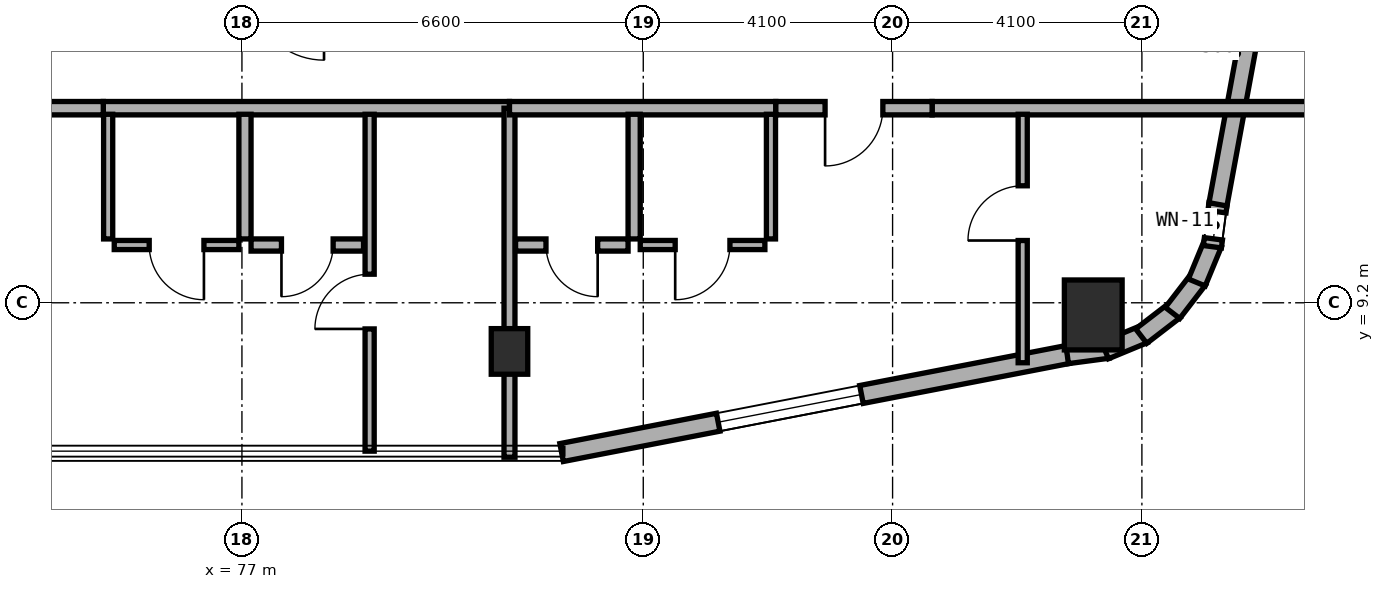
"""IFC4 building model, lengths in metres.
Left out: names, types, materials, properties, quantities, classifications, styles, units other than length and angle.
Written with IfcOpenShell. Run it as: python <this file> out.ifc"""

import sys

from ifc_helpers import new_model, si_unit, direction, frame, frame_2d, origin, origin_2d, place, context, subcontext, project, spatial, rectangle, extrude, element, fill, save


model = new_model("IFC4")
c1 = context("Model", 3, precision=1e-05, world=origin(), true_north=direction((0.0, 1.0)))
c2 = subcontext(c1, "Body", "Model", "MODEL_VIEW")
j1 = project(units=[si_unit("LENGTHUNIT", "METRE"), si_unit("PLANEANGLEUNIT", "RADIAN")], contexts=[c1])
p1 = place(None, origin())
s1 = spatial("IfcSite", under=j1, at=p1, CompositionType="ELEMENT")
p2 = place(p1, origin())
s2 = spatial("IfcBuilding", under=s1, at=p2, CompositionType="ELEMENT")
p3 = place(p2, frame((0.0, 0.0, 83.5)))
s3 = spatial("IfcBuildingStorey", under=s2, at=p3, CompositionType="ELEMENT", Elevation=83.5)
p4 = place(p3, frame((81.4, 8.4, 0.0), z_axis=(0.0, 0.0, 1.0), x_axis=(1.0, 0.0, 0.0)))
e1 = element("IfcColumn", 1, at=p4, inside=s3, PredefinedType="COLUMN", context=c2, shape_type="SweptSolid", body=[
    extrude(rectangle(XDim=0.6, YDim=0.75, at=origin_2d()), origin(), (0.0, 0.0, 1.0), 3.5),
])
p5 = place(p3, frame((91.0, 9.0, 0.0), z_axis=(0.0, 0.0, 1.0), x_axis=(1.0, 0.0, 0.0)))
e2 = element("IfcColumn", 2, at=p5, inside=s3, PredefinedType="COLUMN", context=c2, shape_type="SweptSolid", body=[
    extrude(rectangle(XDim=0.95, YDim=1.15, at=origin_2d()), origin(), (0.0, 0.0, 1.0), 3.5),
])
p6 = place(p3, frame((82.257, 6.737, 0.0), z_axis=(0.0, 0.0, 1.0), x_axis=(0.981750199588, 0.190175039396, 0.0)))
e3 = element("IfcWall", 3, at=p6, inside=s3, PredefinedType="STANDARD", context=c2, shape_type="SweptSolid", body=[
    extrude(rectangle(XDim=8.477, YDim=0.3, at=frame_2d((4.238, 0.0))), origin(), (0.0, 0.0, 1.0), 3.25),
])
p7 = place(p6, frame((2.623, 0.0, 0.8)))
e4 = element("IfcOpeningElement", 4, at=p7, cuts=e3, PredefinedType="OPENING", context=c2, shape_type="SweptSolid", body=[
    extrude(rectangle(XDim=2.4, YDim=1.6, at=frame_2d((1.2, 0.8))), frame((0.0, 0.16, 0.0), z_axis=(0.0, -1.0, 0.0), x_axis=(1.0, 0.0, 0.0)), (0.0, 0.0, 1.0), 0.32),
])
p8 = place(p3, frame((90.572, 8.348, 0.0), z_axis=(0.0, 0.0, 1.0), x_axis=(0.991293937098, 0.131667498923, 0.0)))
e5 = element("IfcWall", 5, at=p8, inside=s3, PredefinedType="STANDARD", context=c2, shape_type="SweptSolid", body=[
    extrude(rectangle(XDim=0.677, YDim=0.3, at=frame_2d((0.338, 0.0))), origin(), (0.0, 0.0, 1.0), 3.25),
])
p9 = place(p3, frame((91.193, 8.418, 0.0), z_axis=(0.0, 0.0, 1.0), x_axis=(0.924042561464, 0.382289608286, 0.0)))
e6 = element("IfcWall", 6, at=p9, inside=s3, PredefinedType="STANDARD", context=c2, shape_type="SweptSolid", body=[
    extrude(rectangle(XDim=0.694, YDim=0.3, at=frame_2d((0.347, 0.0))), origin(), (0.0, 0.0, 1.0), 3.25),
])
for number, where, z_axis, x_axis in (
    (7, (91.789, 8.652, 0.0), (0.0, 0.0, 1.0), (0.793, 0.609, 0.0)),
    (8, (92.304, 9.033, 0.0), (0.0, 0.0, 1.0), (0.61, 0.793, 0.0)),
    (9, (92.703, 9.534, 0.0), (0.0, 0.0, 1.0), (0.382, 0.924, 0.0)),
):
    element("IfcWall", number, at=place(p3, frame(where, z_axis=z_axis, x_axis=x_axis)), inside=s3, PredefinedType="STANDARD", context=c2, shape_type="SweptSolid", body=[
        extrude(rectangle(XDim=0.694, YDim=0.3, at=frame_2d((0.347, 0.0))), origin(), (0.0, 0.0, 1.0), 3.25),
    ])
p10 = place(p3, frame((92.959, 10.122, 0.0), z_axis=(0.0, 0.0, 1.0), x_axis=(0.130658543777, 0.991427427974, 0.0)))
e10 = element("IfcWall", 10, at=p10, inside=s3, PredefinedType="STANDARD", context=c2, shape_type="SweptSolid", body=[
    extrude(rectangle(XDim=0.712, YDim=0.3, at=frame_2d((0.356, 0.0))), origin(), (0.0, 0.0, 1.0), 3.25),
])
p11 = place(p10, frame((0.131, 0.0, 0.85)))
e11 = element("IfcOpeningElement", 11, at=p11, cuts=e10, PredefinedType="OPENING", context=c2, shape_type="SweptSolid", body=[
    extrude(rectangle(XDim=0.45, YDim=1.5, at=frame_2d((0.225, 0.75))), frame((0.0, 0.16, 0.0), z_axis=(0.0, -1.0, 0.0), x_axis=(1.0, 0.0, 0.0)), (0.0, 0.0, 1.0), 0.32),
])
p12 = place(p3, frame((93.051, 10.819, 0.0), z_axis=(0.0, 0.0, 1.0), x_axis=(0.181241420611, 0.983438634311, 0.0)))
e12 = element("IfcWall", 12, at=p12, inside=s3, PredefinedType="STANDARD", context=c2, shape_type="SweptSolid", body=[
    extrude(rectangle(XDim=8.889, YDim=0.3, at=frame_2d((4.445, 0.0))), origin(), (0.0, 0.0, 1.0), 3.25),
])
p13 = place(p12, frame((4.993, 0.0, 0.8)))
e13 = element("IfcOpeningElement", 13, at=p13, cuts=e12, PredefinedType="OPENING", context=c2, shape_type="SweptSolid", body=[
    extrude(rectangle(XDim=2.4, YDim=1.6, at=frame_2d((1.2, 0.8))), frame((0.0, 0.16, 0.0), z_axis=(0.0, -1.0, 0.0), x_axis=(1.0, 0.0, 0.0)), (0.0, 0.0, 1.0), 0.32),
])
p14 = place(p3, frame((74.72, 12.4, 0.0), z_axis=(0.0, 0.0, 1.0), x_axis=(1.0, 0.0, 0.0)))
e14 = element("IfcWall", 14, at=p14, inside=s3, PredefinedType="SOLIDWALL", context=c2, shape_type="SweptSolid", body=[
    extrude(rectangle(XDim=6.68, YDim=0.22, at=frame_2d((3.34, 0.0))), origin(), (0.0, 0.0, 1.0), 2.825),
])
p15 = place(p3, frame((65.85, 12.4, 0.0), z_axis=(0.0, 0.0, 1.0), x_axis=(1.0, 0.0, 0.0)))
e15 = element("IfcWall", 15, at=p15, inside=s3, PredefinedType="SOLIDWALL", context=c2, shape_type="SweptSolid", body=[
    extrude(rectangle(XDim=8.87, YDim=0.22, at=frame_2d((4.435, 0.0))), origin(), (0.0, 0.0, 1.0), 2.825),
])
p16 = place(p15, frame((3.96, 0.0, 0.0)))
e16 = element("IfcOpeningElement", 16, at=p16, cuts=e15, PredefinedType="OPENING", context=c2, shape_type="SweptSolid", body=[
    extrude(rectangle(XDim=0.95, YDim=2.1, at=frame_2d((0.475, 1.05))), frame((0.0, 0.12, 0.0), z_axis=(0.0, -1.0, 0.0), x_axis=(1.0, 0.0, 0.0)), (0.0, 0.0, 1.0), 0.24),
])
p17 = place(p3, frame((79.1, 6.76, 0.0), z_axis=(0.0, 0.0, 1.0), x_axis=(0.0, 1.0, 0.0)))
e17 = element("IfcWall", 17, at=p17, inside=s3, PredefinedType="PARTITIONING", context=c2, shape_type="SweptSolid", body=[
    extrude(rectangle(XDim=5.54, YDim=0.15, at=frame_2d((2.77, 0.0))), origin(), (0.0, 0.0, 1.0), 2.865),
])
p18 = place(p17, frame((2.01, 0.0, 0.0)))
e18 = element("IfcOpeningElement", 18, at=p18, cuts=e17, PredefinedType="OPENING", context=c2, shape_type="SweptSolid", body=[
    extrude(rectangle(XDim=0.9, YDim=2.1, at=frame_2d((0.45, 1.05))), frame((0.0, 0.085, 0.0), z_axis=(0.0, -1.0, 0.0), x_axis=(1.0, 0.0, 0.0)), (0.0, 0.0, 1.0), 0.17),
])
p19 = place(p3, frame((77.05, 10.25, 0.0), z_axis=(0.0, 0.0, 1.0), x_axis=(0.0, 1.0, 0.0)))
e19 = element("IfcWall", 19, at=p19, inside=s3, PredefinedType="PLUMBINGWALL", context=c2, shape_type="SweptSolid", body=[
    extrude(rectangle(XDim=2.05, YDim=0.2, at=frame_2d((1.025, 0.0))), origin(), (0.0, 0.0, 1.0), 2.865),
])
p20 = place(p3, frame((74.8, 10.25, 0.0), z_axis=(0.0, 0.0, 1.0), x_axis=(0.0, 1.0, 0.0)))
e20 = element("IfcWall", 20, at=p20, inside=s3, PredefinedType="PARTITIONING", context=c2, shape_type="SweptSolid", body=[
    extrude(rectangle(XDim=2.05, YDim=0.15, at=frame_2d((1.025, 0.0))), origin(), (0.0, 0.0, 1.0), 2.865),
])
p21 = place(p3, frame((77.15, 10.15, 0.0), z_axis=(0.0, 0.0, 1.0), x_axis=(1.0, 0.0, 0.0)))
e21 = element("IfcWall", 21, at=p21, inside=s3, PredefinedType="PLUMBINGWALL", context=c2, shape_type="SweptSolid", body=[
    extrude(rectangle(XDim=1.85, YDim=0.2, at=frame_2d((0.925, 0.0))), origin(), (0.0, 0.0, 1.0), 3.22),
])
p22 = place(p21, frame((0.5, 0.0, 0.0)))
e22 = element("IfcOpeningElement", 22, at=p22, cuts=e21, PredefinedType="OPENING", context=c2, shape_type="SweptSolid", body=[
    extrude(rectangle(XDim=0.85, YDim=2.1, at=frame_2d((0.425, 1.05))), frame((0.0, 0.11, 0.0), z_axis=(0.0, -1.0, 0.0), x_axis=(1.0, 0.0, 0.0)), (0.0, 0.0, 1.0), 0.22),
])
p23 = place(p3, frame((74.9, 10.15, 0.0), z_axis=(0.0, 0.0, 1.0), x_axis=(1.0, 0.0, 0.0)))
e23 = element("IfcWall", 23, at=p23, inside=s3, PredefinedType="PARTITIONING", context=c2, shape_type="SweptSolid", body=[
    extrude(rectangle(XDim=2.05, YDim=0.15, at=frame_2d((1.025, 0.0))), origin(), (0.0, 0.0, 1.0), 3.22),
])
p24 = place(p23, frame((0.575, 0.0, 0.0)))
e24 = element("IfcOpeningElement", 24, at=p24, cuts=e23, PredefinedType="OPENING", context=c2, shape_type="SweptSolid", body=[
    extrude(rectangle(XDim=0.9, YDim=2.1, at=frame_2d((0.45, 1.05))), frame((0.0, 0.085, 0.0), z_axis=(0.0, -1.0, 0.0), x_axis=(1.0, 0.0, 0.0)), (0.0, 0.0, 1.0), 0.17),
])
p25 = place(p3, frame((81.4, 6.66, 0.0), z_axis=(0.0, 0.0, 1.0), x_axis=(0.0, 1.0, 0.0)))
e25 = element("IfcWall", 25, at=p25, inside=s3, PredefinedType="SOLIDWALL", context=c2, shape_type="SweptSolid", body=[
    extrude(rectangle(XDim=5.74, YDim=0.18, at=frame_2d((2.87, 0.0))), origin(), (0.0, 0.0, 1.0), 2.825),
])
p26 = place(p3, frame((81.4, 12.4, 0.0), z_axis=(0.0, 0.0, 1.0), x_axis=(1.0, 0.0, 0.0)))
e26 = element("IfcWall", 26, at=p26, inside=s3, PredefinedType="SOLIDWALL", context=c2, shape_type="SweptSolid", body=[
    extrude(rectangle(XDim=4.38, YDim=0.22, at=frame_2d((2.19, 0.0))), origin(), (0.0, 0.0, 1.0), 2.825),
])
p27 = place(p3, frame((88.35, 12.4, 0.0), z_axis=(0.0, 0.0, 1.0), x_axis=(1.0, 0.0, 0.0)))
e27 = element("IfcWall", 27, at=p27, inside=s3, PredefinedType="SOLIDWALL", context=c2, shape_type="SweptSolid", body=[
    extrude(rectangle(XDim=6.29, YDim=0.22, at=frame_2d((3.145, 0.0))), origin(), (0.0, 0.0, 1.0), 2.945),
])
p28 = place(p3, frame((85.78, 12.4, 0.0), z_axis=(0.0, 0.0, 1.0), x_axis=(1.0, 0.0, 0.0)))
e28 = element("IfcWall", 28, at=p28, inside=s3, PredefinedType="SOLIDWALL", context=c2, shape_type="SweptSolid", body=[
    extrude(rectangle(XDim=2.57, YDim=0.22, at=frame_2d((1.285, 0.0))), origin(), (0.0, 0.0, 1.0), 3.22),
])
p29 = place(p28, frame((0.81, 0.0, 0.0)))
e29 = element("IfcOpeningElement", 29, at=p29, cuts=e28, PredefinedType="OPENING", context=c2, shape_type="SweptSolid", body=[
    extrude(rectangle(XDim=0.95, YDim=2.1, at=frame_2d((0.475, 1.05))), frame((0.0, 0.12, 0.0), z_axis=(0.0, -1.0, 0.0), x_axis=(1.0, 0.0, 0.0)), (0.0, 0.0, 1.0), 0.24),
])
p30 = place(p3, frame((89.84, 8.214, 0.0), z_axis=(0.0, 0.0, 1.0), x_axis=(0.0, 1.0, 0.0)))
e30 = element("IfcWall", 30, at=p30, inside=s3, PredefinedType="PARTITIONING", context=c2, shape_type="SweptSolid", body=[
    extrude(rectangle(XDim=4.086, YDim=0.15, at=frame_2d((2.043, 0.0))), origin(), (0.0, 0.0, 1.0), 2.945),
])
p31 = place(p30, frame((2.01, 0.0, 0.0)))
e31 = element("IfcOpeningElement", 31, at=p31, cuts=e30, PredefinedType="OPENING", context=c2, shape_type="SweptSolid", body=[
    extrude(rectangle(XDim=0.9, YDim=2.1, at=frame_2d((0.45, 1.05))), frame((0.0, 0.085, 0.0), z_axis=(0.0, -1.0, 0.0), x_axis=(1.0, 0.0, 0.0)), (0.0, 0.0, 1.0), 0.17),
])
p32 = place(p3, frame((83.45, 10.25, 0.0), z_axis=(0.0, 0.0, 1.0), x_axis=(0.0, 1.0, 0.0)))
e32 = element("IfcWall", 32, at=p32, inside=s3, PredefinedType="PLUMBINGWALL", context=c2, shape_type="SweptSolid", body=[
    extrude(rectangle(XDim=2.05, YDim=0.2, at=frame_2d((1.025, 0.0))), origin(), (0.0, 0.0, 1.0), 3.22),
])
p33 = place(p3, frame((85.7, 10.25, 0.0), z_axis=(0.0, 0.0, 1.0), x_axis=(0.0, 1.0, 0.0)))
e33 = element("IfcWall", 33, at=p33, inside=s3, PredefinedType="PARTITIONING", context=c2, shape_type="SweptSolid", body=[
    extrude(rectangle(XDim=2.05, YDim=0.15, at=frame_2d((1.025, 0.0))), origin(), (0.0, 0.0, 1.0), 3.22),
])
p34 = place(p3, frame((81.5, 10.15, 0.0), z_axis=(0.0, 0.0, 1.0), x_axis=(1.0, 0.0, 0.0)))
e34 = element("IfcWall", 34, at=p34, inside=s3, PredefinedType="PLUMBINGWALL", context=c2, shape_type="SweptSolid", body=[
    extrude(rectangle(XDim=1.85, YDim=0.2, at=frame_2d((0.925, 0.0))), origin(), (0.0, 0.0, 1.0), 2.825),
])
p35 = place(p34, frame((0.5, 0.0, 0.0)))
e35 = element("IfcOpeningElement", 35, at=p35, cuts=e34, PredefinedType="OPENING", context=c2, shape_type="SweptSolid", body=[
    extrude(rectangle(XDim=0.85, YDim=2.1, at=frame_2d((0.425, 1.05))), frame((0.0, 0.11, 0.0), z_axis=(0.0, -1.0, 0.0), x_axis=(1.0, 0.0, 0.0)), (0.0, 0.0, 1.0), 0.22),
])
p36 = place(p3, frame((83.55, 10.15, 0.0), z_axis=(0.0, 0.0, 1.0), x_axis=(1.0, 0.0, 0.0)))
e36 = element("IfcWall", 36, at=p36, inside=s3, PredefinedType="PARTITIONING", context=c2, shape_type="SweptSolid", body=[
    extrude(rectangle(XDim=2.05, YDim=0.15, at=frame_2d((1.025, 0.0))), origin(), (0.0, 0.0, 1.0), 3.22),
])
p37 = place(p36, frame((0.575, 0.0, 0.0)))
e37 = element("IfcOpeningElement", 37, at=p37, cuts=e36, PredefinedType="OPENING", context=c2, shape_type="SweptSolid", body=[
    extrude(rectangle(XDim=0.9, YDim=2.1, at=frame_2d((0.45, 1.05))), frame((0.0, 0.085, 0.0), z_axis=(0.0, -1.0, 0.0), x_axis=(1.0, 0.0, 0.0)), (0.0, 0.0, 1.0), 0.17),
])
p38 = place(p7, origin())
e38 = element("IfcWindow", 38, at=p38, inside=s3, PartitioningType="SINGLE_PANEL", PredefinedType="WINDOW", context=c2, shape_type="SweptSolid", body=[
    extrude(rectangle(XDim=2.4, YDim=1.6, at=frame_2d((1.2, 0.8))), frame((0.0, 0.03, 0.0), z_axis=(0.0, -1.0, 0.0), x_axis=(1.0, 0.0, 0.0)), (0.0, 0.0, 1.0), 0.06),
])
fill(e4, e38)
p39 = place(p11, origin())
e39 = element("IfcWindow", 39, at=p39, inside=s3, PartitioningType="SINGLE_PANEL", PredefinedType="WINDOW", context=c2, shape_type="SweptSolid", body=[
    extrude(rectangle(XDim=0.45, YDim=1.5, at=frame_2d((0.225, 0.75))), frame((0.0, 0.03, 0.0), z_axis=(0.0, -1.0, 0.0), x_axis=(1.0, 0.0, 0.0)), (0.0, 0.0, 1.0), 0.06),
])
fill(e11, e39)
p40 = place(p18, origin())
e40 = element("IfcDoor", 40, at=p40, inside=s3, OperationType="SINGLE_SWING_LEFT", PredefinedType="DOOR", context=c2, shape_type="SweptSolid", body=[
    extrude(rectangle(XDim=0.9, YDim=2.1, at=frame_2d((0.45, 1.05))), frame((0.0, 0.025, 0.0), z_axis=(0.0, -1.0, 0.0), x_axis=(1.0, 0.0, 0.0)), (0.0, 0.0, 1.0), 0.05),
])
fill(e18, e40)
p41 = place(p22, frame((0.85, 0.0, 0.0), z_axis=(0.0, 0.0, 1.0), x_axis=(-1.0, 0.0, 0.0)))
e41 = element("IfcDoor", 41, at=p41, inside=s3, OperationType="SINGLE_SWING_RIGHT", PredefinedType="DOOR", context=c2, shape_type="SweptSolid", body=[
    extrude(rectangle(XDim=0.85, YDim=2.1, at=frame_2d((0.425, 1.05))), frame((0.0, 0.025, 0.0), z_axis=(0.0, -1.0, 0.0), x_axis=(1.0, 0.0, 0.0)), (0.0, 0.0, 1.0), 0.05),
])
fill(e22, e41)
p42 = place(p24, frame((0.9, 0.0, 0.0), z_axis=(0.0, 0.0, 1.0), x_axis=(-1.0, 0.0, 0.0)))
e42 = element("IfcDoor", 42, at=p42, inside=s3, OperationType="SINGLE_SWING_LEFT", PredefinedType="DOOR", context=c2, shape_type="SweptSolid", body=[
    extrude(rectangle(XDim=0.9, YDim=2.1, at=frame_2d((0.45, 1.05))), frame((0.0, 0.025, 0.0), z_axis=(0.0, -1.0, 0.0), x_axis=(1.0, 0.0, 0.0)), (0.0, 0.0, 1.0), 0.05),
])
fill(e24, e42)
p43 = place(p29, frame((0.95, 0.0, 0.0), z_axis=(0.0, 0.0, 1.0), x_axis=(-1.0, 0.0, 0.0)))
e43 = element("IfcDoor", 43, at=p43, inside=s3, OperationType="SINGLE_SWING_RIGHT", PredefinedType="DOOR", context=c2, shape_type="SweptSolid", body=[
    extrude(rectangle(XDim=0.95, YDim=2.1, at=frame_2d((0.475, 1.05))), frame((0.0, 0.025, 0.0), z_axis=(0.0, -1.0, 0.0), x_axis=(1.0, 0.0, 0.0)), (0.0, 0.0, 1.0), 0.05),
])
fill(e29, e43)
p44 = place(p31, origin())
e44 = element("IfcDoor", 44, at=p44, inside=s3, OperationType="SINGLE_SWING_LEFT", PredefinedType="DOOR", context=c2, shape_type="SweptSolid", body=[
    extrude(rectangle(XDim=0.9, YDim=2.1, at=frame_2d((0.45, 1.05))), frame((0.0, 0.025, 0.0), z_axis=(0.0, -1.0, 0.0), x_axis=(1.0, 0.0, 0.0)), (0.0, 0.0, 1.0), 0.05),
])
fill(e31, e44)
p45 = place(p35, frame((0.85, 0.0, 0.0), z_axis=(0.0, 0.0, 1.0), x_axis=(-1.0, 0.0, 0.0)))
e45 = element("IfcDoor", 45, at=p45, inside=s3, OperationType="SINGLE_SWING_LEFT", PredefinedType="DOOR", context=c2, shape_type="SweptSolid", body=[
    extrude(rectangle(XDim=0.85, YDim=2.1, at=frame_2d((0.425, 1.05))), frame((0.0, 0.025, 0.0), z_axis=(0.0, -1.0, 0.0), x_axis=(1.0, 0.0, 0.0)), (0.0, 0.0, 1.0), 0.05),
])
fill(e35, e45)
p46 = place(p37, frame((0.9, 0.0, 0.0), z_axis=(0.0, 0.0, 1.0), x_axis=(-1.0, 0.0, 0.0)))
e46 = element("IfcDoor", 46, at=p46, inside=s3, OperationType="SINGLE_SWING_RIGHT", PredefinedType="DOOR", context=c2, shape_type="SweptSolid", body=[
    extrude(rectangle(XDim=0.9, YDim=2.1, at=frame_2d((0.45, 1.05))), frame((0.0, 0.025, 0.0), z_axis=(0.0, -1.0, 0.0), x_axis=(1.0, 0.0, 0.0)), (0.0, 0.0, 1.0), 0.05),
])
fill(e37, e46)
save(model, sys.argv[1])
